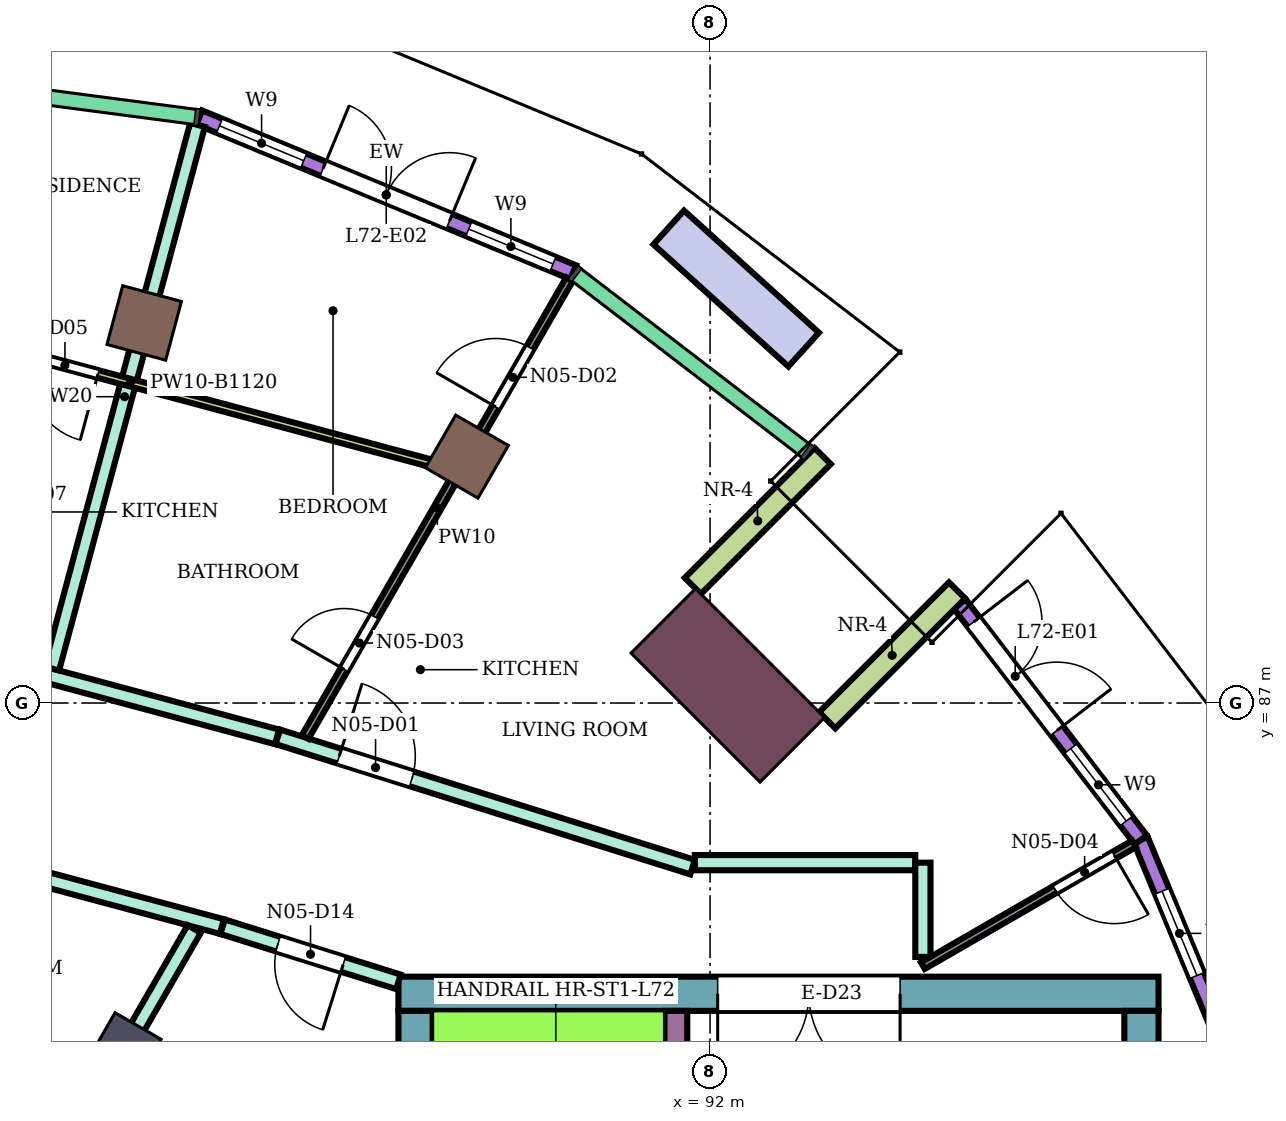
"""IFC4 building model, lengths in metres.
Left out: names, types, materials, properties, quantities, classifications, styles, units other than length and angle.
Written with IfcOpenShell. Run it as: python <this file> out.ifc"""

import sys

from ifc_helpers import new_model, si_unit, direction, frame, frame_2d, origin, origin_2d, place, context, subcontext, project, spatial, rectangle, extrude, element, fill, save


model = new_model("IFC4")
c1 = context("Model", 3, precision=1e-05, world=origin(), true_north=direction((0.0, 1.0)))
c2 = subcontext(c1, "Body", "Model", "MODEL_VIEW")
j1 = project(units=[si_unit("LENGTHUNIT", "METRE"), si_unit("PLANEANGLEUNIT", "RADIAN")], contexts=[c1])
p1 = place(None, origin())
s1 = spatial("IfcSite", under=j1, at=p1, CompositionType="ELEMENT")
p2 = place(p1, origin())
s2 = spatial("IfcBuilding", under=s1, at=p2, CompositionType="ELEMENT")
p3 = place(p2, frame((0.0, 0.0, 314.9)))
s3 = spatial("IfcBuildingStorey", under=s2, at=p3, CompositionType="ELEMENT", Elevation=314.9)
for number, where, z_axis, x_axis in (
    (1, (88.8, 90.242, 0.0), (0.0, 0.0, 1.0), (0.5, 0.866, 0.0)),
    (2, (84.555, 92.0, 0.0), (0.0, 0.0, 1.0), (0.259, 0.966, 0.0)),
):
    element("IfcColumn", number, at=place(p3, frame(where, z_axis=z_axis, x_axis=x_axis)), inside=s3, PredefinedType="COLUMN", context=c2, shape_type="SweptSolid", body=[
        extrude(rectangle(XDim=0.8, YDim=0.8, at=origin_2d()), origin(), (0.0, 0.0, 1.0), 4.4),
    ])
p4 = place(p3, frame((84.3, 82.448, 0.0), z_axis=(0.0, 0.0, 1.0), x_axis=(0.5, 0.866025403784, 0.0)))
e3 = element("IfcColumn", 3, at=p4, inside=s3, PredefinedType="COLUMN", context=c2, shape_type="SweptSolid", body=[
    extrude(rectangle(XDim=0.7, YDim=0.7, at=origin_2d()), origin(), (0.0, 0.0, 1.0), 4.4),
])
p5 = place(p3, frame((92.233, 87.233, 0.0), z_axis=(0.0, 0.0, 1.0), x_axis=(0.707106781187, 0.707106781187, 0.0)))
e4 = element("IfcColumn", 4, at=p5, inside=s3, PredefinedType="COLUMN", context=c2, shape_type="SweptSolid", body=[
    extrude(rectangle(XDim=1.2, YDim=2.4, at=origin_2d()), origin(), (0.0, 0.0, 1.0), 4.4),
])
p6 = place(p3, frame((87.9, 83.175, 0.0), z_axis=(0.0, 0.0, 1.0), x_axis=(1.0, 0.0, 0.0)))
e5 = element("IfcWall", 5, at=p6, inside=s3, PredefinedType="SHEAR", context=c2, shape_type="SweptSolid", body=[
    extrude(rectangle(XDim=10.0, YDim=0.45, at=frame_2d((5.0, 0.0))), origin(), (0.0, 0.0, 1.0), 4.08),
])
p7 = place(p6, frame((4.2, 0.0, 0.0)))
e6 = element("IfcOpeningElement", 6, at=p7, cuts=e5, PredefinedType="OPENING", context=c2, shape_type="SweptSolid", body=[
    extrude(rectangle(XDim=2.4, YDim=2.4, at=frame_2d((1.2, 1.2))), frame((0.0, 0.235, 0.0), z_axis=(0.0, -1.0, 0.0), x_axis=(1.0, 0.0, 0.0)), (0.0, 0.0, 1.0), 0.47),
])
p8 = place(p3, frame((88.125, 75.0, 0.0), z_axis=(0.0, 0.0, 1.0), x_axis=(0.0, 1.0, 0.0)))
e7 = element("IfcWall", 7, at=p8, inside=s3, PredefinedType="SHEAR", context=c2, shape_type="SweptSolid", body=[
    extrude(rectangle(XDim=7.95, YDim=0.45, at=frame_2d((3.975, 0.0))), origin(), (0.0, 0.0, 1.0), 4.08),
])
p9 = place(p3, frame((97.675, 73.6, 0.0), z_axis=(0.0, 0.0, 1.0), x_axis=(0.0, 1.0, 0.0)))
e8 = element("IfcWall", 8, at=p9, inside=s3, PredefinedType="SHEAR", context=c2, shape_type="SweptSolid", body=[
    extrude(rectangle(XDim=9.35, YDim=0.45, at=frame_2d((4.675, 0.0))), origin(), (0.0, 0.0, 1.0), 4.08),
])
p10 = place(p3, frame((91.55, 75.0, 0.0), z_axis=(0.0, 0.0, 1.0), x_axis=(0.0, 1.0, 0.0)))
e9 = element("IfcWall", 9, at=p10, inside=s3, PredefinedType="SHEAR", context=c2, shape_type="SweptSolid", body=[
    extrude(rectangle(XDim=7.95, YDim=0.3, at=frame_2d((3.975, 0.0))), origin(), (0.0, 0.0, 1.0), 4.08),
])
p11 = place(p10, frame((1.85, 0.0, 0.0)))
e10 = element("IfcOpeningElement", 10, at=p11, cuts=e9, PredefinedType="OPENING", context=c2, shape_type="SweptSolid", body=[
    extrude(rectangle(XDim=0.9, YDim=2.1, at=frame_2d((0.45, 1.05))), frame((0.0, 0.16, 0.0), z_axis=(0.0, -1.0, 0.0), x_axis=(1.0, 0.0, 0.0)), (0.0, 0.0, 1.0), 0.32),
])
p12 = place(p3, frame((99.704, 80.28, 0.0), z_axis=(0.0, 0.0, 1.0), x_axis=(-0.382690574388, 0.923876574156, 0.0)))
e11 = element("IfcWall", 11, at=p12, inside=s3, PredefinedType="NOTDEFINED", context=c2, shape_type="SweptSolid", body=[
    extrude(rectangle(XDim=5.325, YDim=0.2, at=frame_2d((2.663, 0.0))), origin(), (0.0, 0.0, 1.0), 4.4),
])
p13 = place(p12, frame((0.731, 0.0, 0.9)))
e12 = element("IfcOpeningElement", 12, at=p13, cuts=e11, PredefinedType="OPENING", context=c2, shape_type="SweptSolid", body=[
    extrude(rectangle(XDim=1.2, YDim=2.7, at=frame_2d((0.6, 1.35))), frame((0.0, 0.11, 0.0), z_axis=(0.0, -1.0, 0.0), x_axis=(1.0, 0.0, 0.0)), (0.0, 0.0, 1.0), 0.22),
])
p14 = place(p12, frame((3.394, 0.0, 0.9)))
e13 = element("IfcOpeningElement", 13, at=p14, cuts=e11, PredefinedType="OPENING", context=c2, shape_type="SweptSolid", body=[
    extrude(rectangle(XDim=1.2, YDim=2.7, at=frame_2d((0.6, 1.35))), frame((0.0, 0.11, 0.0), z_axis=(0.0, -1.0, 0.0), x_axis=(1.0, 0.0, 0.0)), (0.0, 0.0, 1.0), 0.22),
])
p15 = place(p3, frame((97.666, 85.199, 0.0), z_axis=(0.0, 0.0, 1.0), x_axis=(-0.608757608177, 0.793356272104, 0.0)))
e14 = element("IfcWall", 14, at=p15, inside=s3, PredefinedType="NOTDEFINED", context=c2, shape_type="SweptSolid", body=[
    extrude(rectangle(XDim=3.913, YDim=0.2, at=frame_2d((1.957, 0.0))), origin(), (0.0, 0.0, 1.0), 4.4),
])
p16 = place(p15, frame((0.313, 0.0, 0.9)))
e15 = element("IfcOpeningElement", 15, at=p16, cuts=e14, PredefinedType="OPENING", context=c2, shape_type="SweptSolid", body=[
    extrude(rectangle(XDim=1.2, YDim=2.7, at=frame_2d((0.6, 1.35))), frame((0.0, 0.11, 0.0), z_axis=(0.0, -1.0, 0.0), x_axis=(1.0, 0.0, 0.0)), (0.0, 0.0, 1.0), 0.22),
])
p17 = place(p15, frame((1.813, 0.0, 0.0)))
e16 = element("IfcOpeningElement", 16, at=p17, cuts=e14, PredefinedType="OPENING", context=c2, shape_type="SweptSolid", body=[
    extrude(rectangle(XDim=1.8, YDim=2.7, at=frame_2d((0.9, 1.35))), frame((0.0, 0.11, 0.0), z_axis=(0.0, -1.0, 0.0), x_axis=(1.0, 0.0, 0.0)), (0.0, 0.0, 1.0), 0.22),
])
p18 = place(p3, frame((90.199, 92.666, 0.0), z_axis=(0.0, 0.0, 1.0), x_axis=(-0.923876574156, 0.382690574388, 0.0)))
e17 = element("IfcWall", 17, at=p18, inside=s3, PredefinedType="NOTDEFINED", context=c2, shape_type="SweptSolid", body=[
    extrude(rectangle(XDim=5.325, YDim=0.2, at=frame_2d((2.663, 0.0))), origin(), (0.0, 0.0, 1.0), 4.4),
])
p19 = place(p18, frame((0.288, 0.0, 0.9)))
e18 = element("IfcOpeningElement", 18, at=p19, cuts=e17, PredefinedType="OPENING", context=c2, shape_type="SweptSolid", body=[
    extrude(rectangle(XDim=1.2, YDim=2.7, at=frame_2d((0.6, 1.35))), frame((0.0, 0.11, 0.0), z_axis=(0.0, -1.0, 0.0), x_axis=(1.0, 0.0, 0.0)), (0.0, 0.0, 1.0), 0.22),
])
p20 = place(p18, frame((1.763, 0.0, 0.0)))
e19 = element("IfcOpeningElement", 19, at=p20, cuts=e17, PredefinedType="OPENING", context=c2, shape_type="SweptSolid", body=[
    extrude(rectangle(XDim=1.8, YDim=2.7, at=frame_2d((0.9, 1.35))), frame((0.0, 0.11, 0.0), z_axis=(0.0, -1.0, 0.0), x_axis=(1.0, 0.0, 0.0)), (0.0, 0.0, 1.0), 0.22),
])
p21 = place(p18, frame((3.838, 0.0, 0.9)))
e20 = element("IfcOpeningElement", 20, at=p21, cuts=e17, PredefinedType="OPENING", context=c2, shape_type="SweptSolid", body=[
    extrude(rectangle(XDim=1.2, YDim=2.7, at=frame_2d((0.6, 1.35))), frame((0.0, 0.11, 0.0), z_axis=(0.0, -1.0, 0.0), x_axis=(1.0, 0.0, 0.0)), (0.0, 0.0, 1.0), 0.22),
])
for number, where, z_axis, x_axis in (
    (21, (93.541, 86.773, 0.0), (0.0, 0.0, 1.0), (0.707, 0.707, 0.0)),
    (22, (91.773, 88.541, 0.0), (0.0, 0.0, 1.0), (0.707, 0.707, 0.0)),
):
    element("IfcWall", number, at=place(p3, frame(where, z_axis=z_axis, x_axis=x_axis)), inside=s3, PredefinedType="NOTDEFINED", context=c2, shape_type="SweptSolid", body=[
        extrude(rectangle(XDim=2.416, YDim=0.3, at=frame_2d((1.208, 0.0))), origin(), (0.0, 0.0, 1.0), 4.4),
    ])
p22 = place(p3, frame((83.802, 81.585, 0.0), z_axis=(0.0, 0.0, 1.0), x_axis=(-0.965933654434, 0.258789828301, 0.0)))
e23 = element("IfcWall", 23, at=p22, inside=s3, PredefinedType="NOTDEFINED", context=c2, shape_type="SweptSolid", body=[
    extrude(rectangle(XDim=3.936, YDim=0.2, at=frame_2d((1.968, 0.0))), origin(), (0.0, 0.0, 1.0), 4.4),
])
p23 = place(p22, frame((0.468, 0.0, 0.9)))
e24 = element("IfcOpeningElement", 24, at=p23, cuts=e23, PredefinedType="OPENING", context=c2, shape_type="SweptSolid", body=[
    extrude(rectangle(XDim=3.0, YDim=2.3, at=frame_2d((1.5, 1.15))), frame((0.0, 0.11, 0.0), z_axis=(0.0, -1.0, 0.0), x_axis=(1.0, 0.0, 0.0)), (0.0, 0.0, 1.0), 0.22),
])
p24 = place(p3, frame((93.231, 91.65, 0.0), z_axis=(0.0, 0.0, 1.0), x_axis=(-0.741658991894, 0.670777116293, 0.0)))
e25 = element("IfcWall", 25, at=p24, inside=s3, PredefinedType="USERDEFINED", context=c2, shape_type="SweptSolid", body=[
    extrude(rectangle(XDim=2.394, YDim=0.6, at=frame_2d((1.197, 0.0))), origin(), (0.0, 0.0, 1.0), 0.6),
])
p25 = place(p3, frame((80.0, 85.554, 0.0), z_axis=(0.0, 0.0, 1.0), x_axis=(0.965928989968, -0.258807237802, 0.0)))
e26 = element("IfcWall", 26, at=p25, inside=s3, PredefinedType="PARTITIONING", context=c2, shape_type="SweptSolid", body=[
    extrude(rectangle(XDim=5.774, YDim=0.2, at=frame_2d((2.887, 0.0))), origin(), (0.0, 0.0, 1.0), 3.95),
])
p26 = place(p25, frame((2.292, 0.0, 0.0)))
e27 = element("IfcOpeningElement", 27, at=p26, cuts=e26, PredefinedType="OPENING", context=c2, shape_type="SweptSolid", body=[
    extrude(rectangle(XDim=0.9, YDim=2.1, at=frame_2d((0.45, 1.05))), frame((0.0, 0.11, 0.0), z_axis=(0.0, -1.0, 0.0), x_axis=(1.0, 0.0, 0.0)), (0.0, 0.0, 1.0), 0.22),
])
p27 = place(p3, frame((80.0, 88.247, 0.0), z_axis=(0.0, 0.0, 1.0), x_axis=(0.965807659316, -0.259259648244, 0.0)))
e28 = element("IfcWall", 28, at=p27, inside=s3, PredefinedType="PARTITIONING", context=c2, shape_type="SweptSolid", body=[
    extrude(rectangle(XDim=6.526, YDim=0.2, at=frame_2d((3.263, 0.0))), origin(), (0.0, 0.0, 1.0), 3.95),
])
p28 = place(p27, frame((1.93, 0.0, 0.0)))
e29 = element("IfcOpeningElement", 29, at=p28, cuts=e28, PredefinedType="OPENING", context=c2, shape_type="SweptSolid", body=[
    extrude(rectangle(XDim=1.0, YDim=2.1, at=frame_2d((0.5, 1.05))), frame((0.0, 0.11, 0.0), z_axis=(0.0, -1.0, 0.0), x_axis=(1.0, 0.0, 0.0)), (0.0, 0.0, 1.0), 0.22),
])
p29 = place(p3, frame((83.339, 87.455, 0.0), z_axis=(0.0, 0.0, 1.0), x_axis=(0.258957498737, 0.965888717114, 0.0)))
e30 = element("IfcWall", 30, at=p29, inside=s3, PredefinedType="PARTITIONING", context=c2, shape_type="SweptSolid", body=[
    extrude(rectangle(XDim=7.404, YDim=0.2, at=frame_2d((3.702, 0.0))), origin(), (0.0, 0.0, 1.0), 3.95),
])
p30 = place(p3, frame((83.85, 81.667, 0.0), z_axis=(0.0, 0.0, 1.0), x_axis=(0.500185068774, 0.865918527909, 0.0)))
e31 = element("IfcWall", 31, at=p30, inside=s3, PredefinedType="PARTITIONING", context=c2, shape_type="SweptSolid", body=[
    extrude(rectangle(XDim=2.726, YDim=0.2, at=frame_2d((1.363, 0.0))), origin(), (0.0, 0.0, 1.0), 3.95),
])
p31 = place(p3, frame((85.587, 84.057, 0.0), z_axis=(0.0, 0.0, 1.0), x_axis=(0.954239513179, -0.299043393987, 0.0)))
e32 = element("IfcWall", 32, at=p31, inside=s3, PredefinedType="PARTITIONING", context=c2, shape_type="SweptSolid", body=[
    extrude(rectangle(XDim=2.424, YDim=0.2, at=frame_2d((1.212, 0.0))), origin(), (0.0, 0.0, 1.0), 3.95),
])
p32 = place(p31, frame((0.762, 0.0, 0.0)))
e33 = element("IfcOpeningElement", 33, at=p32, cuts=e32, PredefinedType="OPENING", context=c2, shape_type="SweptSolid", body=[
    extrude(rectangle(XDim=0.9, YDim=2.1, at=frame_2d((0.45, 1.05))), frame((0.0, 0.11, 0.0), z_axis=(0.0, -1.0, 0.0), x_axis=(1.0, 0.0, 0.0)), (0.0, 0.0, 1.0), 0.22),
])
p33 = place(p3, frame((86.313, 86.555, 0.0), z_axis=(0.0, 0.0, 1.0), x_axis=(0.9540216201, -0.299737799389, 0.0)))
e34 = element("IfcWall", 34, at=p33, inside=s3, PredefinedType="PARTITIONING", context=c2, shape_type="SweptSolid", body=[
    extrude(rectangle(XDim=5.719, YDim=0.2, at=frame_2d((2.86, 0.0))), origin(), (0.0, 0.0, 1.0), 3.95),
])
p34 = place(p33, frame((0.848, 0.0, 0.0)))
e35 = element("IfcOpeningElement", 35, at=p34, cuts=e34, PredefinedType="OPENING", context=c2, shape_type="SweptSolid", body=[
    extrude(rectangle(XDim=1.0, YDim=2.1, at=frame_2d((0.5, 1.05))), frame((0.0, 0.11, 0.0), z_axis=(0.0, -1.0, 0.0), x_axis=(1.0, 0.0, 0.0)), (0.0, 0.0, 1.0), 0.22),
])
p35 = place(p3, frame((91.8, 84.9, 0.0), z_axis=(0.0, 0.0, 1.0), x_axis=(1.0, 0.0, 0.0)))
e36 = element("IfcWall", 36, at=p35, inside=s3, PredefinedType="PARTITIONING", context=c2, shape_type="SweptSolid", body=[
    extrude(rectangle(XDim=2.9, YDim=0.2, at=frame_2d((1.45, 0.0))), origin(), (0.0, 0.0, 1.0), 3.95),
])
p36 = place(p3, frame((94.8, 83.66, 0.0), z_axis=(0.0, 0.0, 1.0), x_axis=(0.0, 1.0, 0.0)))
e37 = element("IfcWall", 37, at=p36, inside=s3, PredefinedType="PARTITIONING", context=c2, shape_type="SweptSolid", body=[
    extrude(rectangle(XDim=1.24, YDim=0.2, at=frame_2d((0.62, 0.0))), origin(), (0.0, 0.0, 1.0), 3.95),
])
p37 = place(p3, frame((80.106, 92.359, 0.0), z_axis=(0.0, 0.0, 1.0), x_axis=(0.965889909151, -0.258953052501, 0.0)))
e38 = element("IfcWall", 38, at=p37, inside=s3, PredefinedType="PARTITIONING", context=c2, shape_type="SweptSolid", body=[
    extrude(rectangle(XDim=8.83, YDim=0.1, at=frame_2d((4.415, 0.0))), origin(), (0.0, 0.0, 1.0), 3.28),
])
p38 = place(p37, frame((3.076, 0.0, 0.0)))
e39 = element("IfcOpeningElement", 39, at=p38, cuts=e38, PredefinedType="OPENING", context=c2, shape_type="SweptSolid", body=[
    extrude(rectangle(XDim=0.9, YDim=2.1, at=frame_2d((0.45, 1.05))), frame((0.0, 0.06, 0.0), z_axis=(0.0, -1.0, 0.0), x_axis=(1.0, 0.0, 0.0)), (0.0, 0.0, 1.0), 0.12),
])
p39 = place(p3, frame((86.673, 86.553, 0.0), z_axis=(0.0, 0.0, 1.0), x_axis=(0.500103298341, 0.865965756245, 0.0)))
e40 = element("IfcWall", 40, at=p39, inside=s3, PredefinedType="PARTITIONING", context=c2, shape_type="SweptSolid", body=[
    extrude(rectangle(XDim=6.955, YDim=0.1, at=frame_2d((3.477, 0.0))), origin(), (0.0, 0.0, 1.0), 3.95),
])
p40 = place(p39, frame((5.015, 0.0, 0.0)))
e41 = element("IfcOpeningElement", 41, at=p40, cuts=e40, PredefinedType="OPENING", context=c2, shape_type="SweptSolid", body=[
    extrude(rectangle(XDim=0.9, YDim=2.1, at=frame_2d((0.45, 1.05))), frame((0.0, 0.06, 0.0), z_axis=(0.0, -1.0, 0.0), x_axis=(1.0, 0.0, 0.0)), (0.0, 0.0, 1.0), 0.12),
])
p41 = place(p39, frame((1.028, 0.0, 0.0)))
e42 = element("IfcOpeningElement", 42, at=p41, cuts=e40, PredefinedType="OPENING", context=c2, shape_type="SweptSolid", body=[
    extrude(rectangle(XDim=0.8, YDim=2.1, at=frame_2d((0.4, 1.05))), frame((0.0, 0.06, 0.0), z_axis=(0.0, -1.0, 0.0), x_axis=(1.0, 0.0, 0.0)), (0.0, 0.0, 1.0), 0.12),
])
p42 = place(p3, frame((94.8, 83.545, 0.0), z_axis=(0.0, 0.0, 1.0), x_axis=(0.866141222235, 0.499799342882, 0.0)))
e43 = element("IfcWall", 43, at=p42, inside=s3, PredefinedType="PARTITIONING", context=c2, shape_type="SweptSolid", body=[
    extrude(rectangle(XDim=3.207, YDim=0.1, at=frame_2d((1.604, 0.0))), origin(), (0.0, 0.0, 1.0), 3.95),
])
p43 = place(p42, frame((2.007, 0.0, 0.0)))
e44 = element("IfcOpeningElement", 44, at=p43, cuts=e43, PredefinedType="OPENING", context=c2, shape_type="SweptSolid", body=[
    extrude(rectangle(XDim=0.9, YDim=2.1, at=frame_2d((0.45, 1.05))), frame((0.0, 0.06, 0.0), z_axis=(0.0, -1.0, 0.0), x_axis=(1.0, 0.0, 0.0)), (0.0, 0.0, 1.0), 0.12),
])
p44 = place(p14, origin())
e45 = element("IfcWindow", 45, at=p44, inside=s3, PartitioningType="SINGLE_PANEL", PredefinedType="WINDOW", context=c2, shape_type="SweptSolid", body=[
    extrude(rectangle(XDim=1.2, YDim=2.7, at=frame_2d((0.6, 1.35))), frame((0.0, 0.03, 0.0), z_axis=(0.0, -1.0, 0.0), x_axis=(1.0, 0.0, 0.0)), (0.0, 0.0, 1.0), 0.06),
])
fill(e13, e45)
p45 = place(p16, origin())
e46 = element("IfcWindow", 46, at=p45, inside=s3, PartitioningType="SINGLE_PANEL", PredefinedType="WINDOW", context=c2, shape_type="SweptSolid", body=[
    extrude(rectangle(XDim=1.2, YDim=2.7, at=frame_2d((0.6, 1.35))), frame((0.0, 0.03, 0.0), z_axis=(0.0, -1.0, 0.0), x_axis=(1.0, 0.0, 0.0)), (0.0, 0.0, 1.0), 0.06),
])
fill(e15, e46)
p46 = place(p17, frame((1.8, 0.0, 0.0), z_axis=(0.0, 0.0, 1.0), x_axis=(-1.0, 0.0, 0.0)))
e47 = element("IfcDoor", 47, at=p46, inside=s3, OperationType="DOUBLE_DOOR_SINGLE_SWING", PredefinedType="DOOR", context=c2, shape_type="SweptSolid", body=[
    extrude(rectangle(XDim=1.8, YDim=2.7, at=frame_2d((0.9, 1.35))), frame((0.0, 0.025, 0.0), z_axis=(0.0, -1.0, 0.0), x_axis=(1.0, 0.0, 0.0)), (0.0, 0.0, 1.0), 0.05),
])
fill(e16, e47)
p47 = place(p19, origin())
e48 = element("IfcWindow", 48, at=p47, inside=s3, PartitioningType="SINGLE_PANEL", PredefinedType="WINDOW", context=c2, shape_type="SweptSolid", body=[
    extrude(rectangle(XDim=1.2, YDim=2.7, at=frame_2d((0.6, 1.35))), frame((0.0, 0.03, 0.0), z_axis=(0.0, -1.0, 0.0), x_axis=(1.0, 0.0, 0.0)), (0.0, 0.0, 1.0), 0.06),
])
fill(e18, e48)
p48 = place(p20, frame((1.8, 0.0, 0.0), z_axis=(0.0, 0.0, 1.0), x_axis=(-1.0, 0.0, 0.0)))
e49 = element("IfcDoor", 49, at=p48, inside=s3, OperationType="DOUBLE_DOOR_SINGLE_SWING", PredefinedType="DOOR", context=c2, shape_type="SweptSolid", body=[
    extrude(rectangle(XDim=1.8, YDim=2.7, at=frame_2d((0.9, 1.35))), frame((0.0, 0.025, 0.0), z_axis=(0.0, -1.0, 0.0), x_axis=(1.0, 0.0, 0.0)), (0.0, 0.0, 1.0), 0.05),
])
fill(e19, e49)
p49 = place(p21, origin())
e50 = element("IfcWindow", 50, at=p49, inside=s3, PartitioningType="SINGLE_PANEL", PredefinedType="WINDOW", context=c2, shape_type="SweptSolid", body=[
    extrude(rectangle(XDim=1.2, YDim=2.7, at=frame_2d((0.6, 1.35))), frame((0.0, 0.03, 0.0), z_axis=(0.0, -1.0, 0.0), x_axis=(1.0, 0.0, 0.0)), (0.0, 0.0, 1.0), 0.06),
])
fill(e20, e50)
p50 = place(p34, origin())
e51 = element("IfcDoor", 51, at=p50, inside=s3, OperationType="SINGLE_SWING_LEFT", PredefinedType="DOOR", context=c2, shape_type="SweptSolid", body=[
    extrude(rectangle(XDim=1.0, YDim=2.1, at=frame_2d((0.5, 1.05))), frame((0.0, 0.025, 0.0), z_axis=(0.0, -1.0, 0.0), x_axis=(1.0, 0.0, 0.0)), (0.0, 0.0, 1.0), 0.05),
])
fill(e35, e51)
p51 = place(p40, origin())
e52 = element("IfcDoor", 52, at=p51, inside=s3, OperationType="SINGLE_SWING_LEFT", PredefinedType="DOOR", context=c2, shape_type="SweptSolid", body=[
    extrude(rectangle(XDim=0.9, YDim=2.1, at=frame_2d((0.45, 1.05))), frame((0.0, 0.025, 0.0), z_axis=(0.0, -1.0, 0.0), x_axis=(1.0, 0.0, 0.0)), (0.0, 0.0, 1.0), 0.05),
])
fill(e41, e52)
p52 = place(p41, origin())
e53 = element("IfcDoor", 53, at=p52, inside=s3, OperationType="SINGLE_SWING_LEFT", PredefinedType="DOOR", context=c2, shape_type="SweptSolid", body=[
    extrude(rectangle(XDim=0.8, YDim=2.1, at=frame_2d((0.4, 1.05))), frame((0.0, 0.025, 0.0), z_axis=(0.0, -1.0, 0.0), x_axis=(1.0, 0.0, 0.0)), (0.0, 0.0, 1.0), 0.05),
])
fill(e42, e53)
p53 = place(p43, frame((0.9, 0.0, 0.0), z_axis=(0.0, 0.0, 1.0), x_axis=(-1.0, 0.0, 0.0)))
e54 = element("IfcDoor", 54, at=p53, inside=s3, OperationType="SINGLE_SWING_LEFT", PredefinedType="DOOR", context=c2, shape_type="SweptSolid", body=[
    extrude(rectangle(XDim=0.9, YDim=2.1, at=frame_2d((0.45, 1.05))), frame((0.0, 0.025, 0.0), z_axis=(0.0, -1.0, 0.0), x_axis=(1.0, 0.0, 0.0)), (0.0, 0.0, 1.0), 0.05),
])
fill(e44, e54)
p54 = place(p38, frame((0.9, 0.0, 0.0), z_axis=(0.0, 0.0, 1.0), x_axis=(-1.0, 0.0, 0.0)))
e55 = element("IfcDoor", 55, at=p54, inside=s3, OperationType="SINGLE_SWING_LEFT", PredefinedType="DOOR", context=c2, shape_type="SweptSolid", body=[
    extrude(rectangle(XDim=0.9, YDim=2.1, at=frame_2d((0.45, 1.05))), frame((0.0, 0.025, 0.0), z_axis=(0.0, -1.0, 0.0), x_axis=(1.0, 0.0, 0.0)), (0.0, 0.0, 1.0), 0.05),
])
fill(e39, e55)
p55 = place(p32, frame((0.9, 0.0, 0.0), z_axis=(0.0, 0.0, 1.0), x_axis=(-1.0, 0.0, 0.0)))
e56 = element("IfcDoor", 56, at=p55, inside=s3, OperationType="SINGLE_SWING_LEFT", PredefinedType="DOOR", context=c2, shape_type="SweptSolid", body=[
    extrude(rectangle(XDim=0.9, YDim=2.1, at=frame_2d((0.45, 1.05))), frame((0.0, 0.025, 0.0), z_axis=(0.0, -1.0, 0.0), x_axis=(1.0, 0.0, 0.0)), (0.0, 0.0, 1.0), 0.05),
])
fill(e33, e56)
p56 = place(p7, frame((2.4, 0.0, 0.0), z_axis=(0.0, 0.0, 1.0), x_axis=(-1.0, 0.0, 0.0)))
e57 = element("IfcDoor", 57, at=p56, inside=s3, OperationType="DOUBLE_DOOR_SINGLE_SWING", PredefinedType="DOOR", context=c2, shape_type="SweptSolid", body=[
    extrude(rectangle(XDim=2.4, YDim=2.4, at=frame_2d((1.2, 1.2))), frame((0.0, 0.025, 0.0), z_axis=(0.0, -1.0, 0.0), x_axis=(1.0, 0.0, 0.0)), (0.0, 0.0, 1.0), 0.05),
])
fill(e6, e57)
save(model, sys.argv[1])
